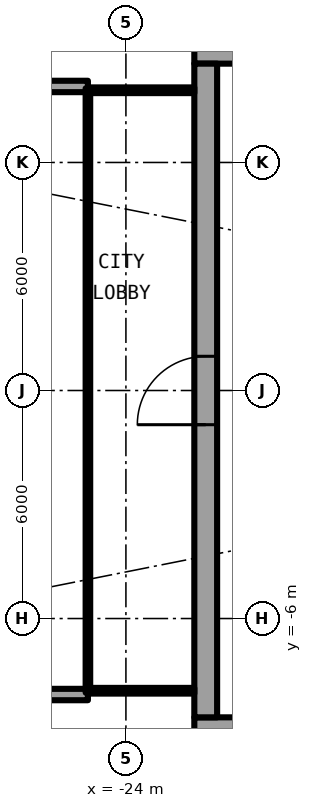
"""IFC4 building model, lengths in metres.
Left out: names, types, materials, properties, quantities, classifications, styles, units other than length and angle.
Written with IfcOpenShell. Run it as: python <this file> out.ifc"""

import sys

from ifc_helpers import new_model, si_unit, direction, frame, frame_2d, origin, place, context, subcontext, project, spatial, rectangle, extrude, element, fill, save


model = new_model("IFC4")
c1 = context("Model", 3, precision=1e-05, world=origin(), true_north=direction((0.0, 1.0)))
c2 = subcontext(c1, "Body", "Model", "MODEL_VIEW")
j1 = project(units=[si_unit("LENGTHUNIT", "METRE"), si_unit("PLANEANGLEUNIT", "RADIAN")], contexts=[c1])
p1 = place(None, origin())
s1 = spatial("IfcSite", under=j1, at=p1, CompositionType="ELEMENT")
p2 = place(p1, origin())
s2 = spatial("IfcBuilding", under=s1, at=p2, CompositionType="ELEMENT")
p3 = place(p2, frame((0.0, 0.0, 120.8)))
s3 = spatial("IfcBuildingStorey", under=s2, at=p3, CompositionType="ELEMENT", Elevation=120.8)
for number, where, z_axis, x_axis in (
    (1, (-25.0, 8.0, 0.0), (0.0, 0.0, 1.0), (-1.0, 0.0, 0.0)),
    (2, (-25.0, -8.0, 0.0), (0.0, 0.0, 1.0), (-1.0, 0.0, 0.0)),
):
    element("IfcWall", number, at=place(p3, frame(where, z_axis=z_axis, x_axis=x_axis)), inside=s3, PredefinedType="SOLIDWALL", context=c2, shape_type="SweptSolid", body=[
        extrude(rectangle(XDim=2.667, YDim=0.3, at=frame_2d((1.333, 0.0))), origin(), (0.0, 0.0, 1.0), 2.7),
    ])
p4 = place(p3, frame((-22.2, -8.9, 0.0), z_axis=(0.0, 0.0, 1.0), x_axis=(1.0, 0.0, 0.0)))
e3 = element("IfcWall", 3, at=p4, inside=s3, PredefinedType="SHEAR", context=c2, shape_type="SweptSolid", body=[
    extrude(rectangle(XDim=13.8, YDim=0.6, at=frame_2d((6.9, 0.0))), origin(), (0.0, 0.0, 1.0), 3.05),
])
p5 = place(p4, frame((1.125, 0.0, 0.0)))
e4 = element("IfcOpeningElement", 4, at=p5, cuts=e3, PredefinedType="OPENING", context=c2, shape_type="SweptSolid", body=[
    extrude(rectangle(XDim=1.2, YDim=2.3, at=frame_2d((0.6, 1.15))), frame((0.0, 0.31, 0.0), z_axis=(0.0, -1.0, 0.0), x_axis=(1.0, 0.0, 0.0)), (0.0, 0.0, 1.0), 0.62),
])
p6 = place(p3, frame((-8.4, 8.9, 0.0), z_axis=(0.0, 0.0, 1.0), x_axis=(-1.0, 0.0, 0.0)))
e5 = element("IfcWall", 5, at=p6, inside=s3, PredefinedType="SHEAR", context=c2, shape_type="SweptSolid", body=[
    extrude(rectangle(XDim=13.8, YDim=0.6, at=frame_2d((6.9, 0.0))), origin(), (0.0, 0.0, 1.0), 3.05),
])
p7 = place(p6, frame((11.475, 0.0, 0.0)))
e6 = element("IfcOpeningElement", 6, at=p7, cuts=e5, PredefinedType="OPENING", context=c2, shape_type="SweptSolid", body=[
    extrude(rectangle(XDim=1.2, YDim=2.3, at=frame_2d((0.6, 1.15))), frame((0.0, 0.31, 0.0), z_axis=(0.0, -1.0, 0.0), x_axis=(1.0, 0.0, 0.0)), (0.0, 0.0, 1.0), 0.62),
])
p8 = place(p3, frame((-21.9, -8.6, 0.0), z_axis=(0.0, 0.0, 1.0), x_axis=(0.0, 1.0, 0.0)))
e7 = element("IfcWall", 7, at=p8, inside=s3, PredefinedType="SHEAR", context=c2, shape_type="SweptSolid", body=[
    extrude(rectangle(XDim=17.2, YDim=0.6, at=frame_2d((8.6, 0.0))), origin(), (0.0, 0.0, 1.0), 3.05),
])
p9 = place(p8, frame((7.7, 0.0, 0.0)))
e8 = element("IfcOpeningElement", 8, at=p9, cuts=e7, PredefinedType="OPENING", context=c2, shape_type="SweptSolid", body=[
    extrude(rectangle(XDim=1.8, YDim=2.3, at=frame_2d((0.9, 1.15))), frame((0.0, 0.31, 0.0), z_axis=(0.0, -1.0, 0.0), x_axis=(1.0, 0.0, 0.0)), (0.0, 0.0, 1.0), 0.62),
])
for number, where, z_axis, x_axis in (
    (9, (-22.2, 7.9, 0.0), (0.0, 0.0, 1.0), (-1.0, 0.0, 0.0)),
    (10, (-22.2, -7.9, 0.0), (0.0, 0.0, 1.0), (-1.0, 0.0, 0.0)),
):
    element("IfcWall", number, at=place(p3, frame(where, z_axis=z_axis, x_axis=x_axis)), inside=s3, PredefinedType="PARTITIONING", context=c2, shape_type="SweptSolid", body=[
        extrude(rectangle(XDim=2.74, YDim=0.15, at=frame_2d((1.37, 0.0))), origin(), (0.0, 0.0, 1.0), 2.7),
    ])
p10 = place(p3, frame((-25.0, 7.95, 0.0), z_axis=(0.0, 0.0, 1.0), x_axis=(0.0, -1.0, 0.0)))
e11 = element("IfcWall", 11, at=p10, inside=s3, PredefinedType="PARTITIONING", context=c2, shape_type="SweptSolid", body=[
    extrude(rectangle(XDim=15.9, YDim=0.12, at=frame_2d((7.95, 0.0))), origin(), (0.0, 0.0, 1.0), 2.7),
])
p11 = place(p10, frame((0.95, 0.0, 0.1)))
e12 = element("IfcOpeningElement", 12, at=p11, cuts=e11, PredefinedType="OPENING", context=c2, shape_type="SweptSolid", body=[
    extrude(rectangle(XDim=14.0, YDim=2.35, at=frame_2d((7.0, 1.175))), frame((0.0, 0.07, 0.0), z_axis=(0.0, -1.0, 0.0), x_axis=(1.0, 0.0, 0.0)), (0.0, 0.0, 1.0), 0.14),
])
p12 = place(p9, origin())
e13 = element("IfcDoor", 13, at=p12, inside=s3, OperationType="SINGLE_SWING_LEFT", PredefinedType="DOOR", context=c2, shape_type="SweptSolid", body=[
    extrude(rectangle(XDim=1.8, YDim=2.3, at=frame_2d((0.9, 1.15))), frame((0.0, 0.025, 0.0), z_axis=(0.0, -1.0, 0.0), x_axis=(1.0, 0.0, 0.0)), (0.0, 0.0, 1.0), 0.05),
])
fill(e8, e13)
p13 = place(p11, origin())
e14 = element("IfcWindow", 14, at=p13, inside=s3, PartitioningType="SINGLE_PANEL", PredefinedType="WINDOW", context=c2, shape_type="SweptSolid", body=[
    extrude(rectangle(XDim=14.0, YDim=2.35, at=frame_2d((7.0, 1.175))), frame((0.0, 0.03, 0.0), z_axis=(0.0, -1.0, 0.0), x_axis=(1.0, 0.0, 0.0)), (0.0, 0.0, 1.0), 0.06),
])
fill(e12, e14)
save(model, sys.argv[1])
